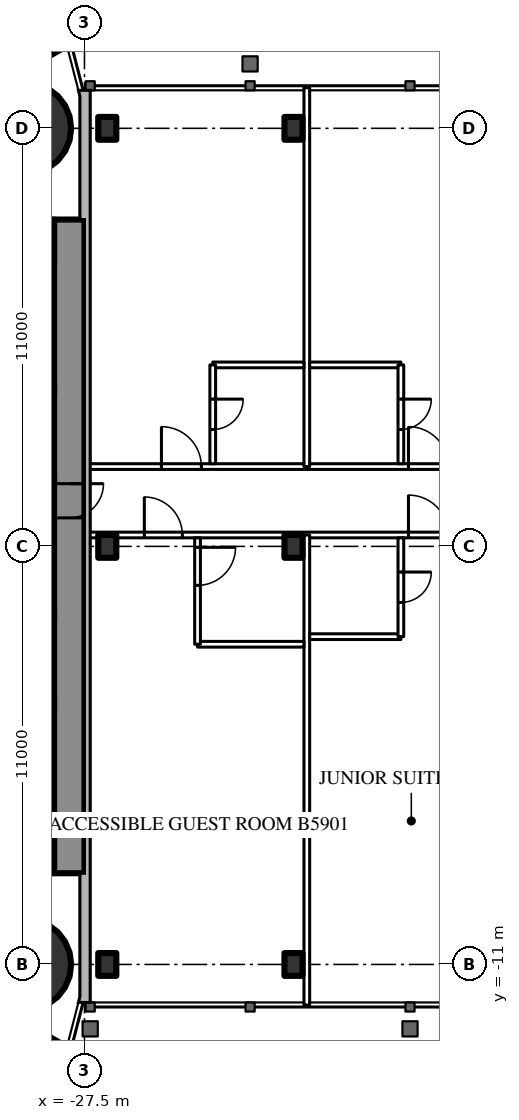
"""IFC4 building model, lengths in metres.
Left out: names, types, materials, properties, quantities, classifications, styles, units other than length and angle.
Written with IfcOpenShell. Run it as: python <this file> out.ifc"""

import sys

from ifc_helpers import new_model, si_unit, direction, frame, frame_2d, origin, origin_2d, place, context, subcontext, project, spatial, rectangle, circle, i_section, extrude, element, fill, save


model = new_model("IFC4")
c1 = context("Model", 3, precision=1e-05, world=origin(), true_north=direction((0.0, 1.0)))
c2 = subcontext(c1, "Body", "Model", "MODEL_VIEW")
j1 = project(units=[si_unit("LENGTHUNIT", "METRE"), si_unit("PLANEANGLEUNIT", "RADIAN")], contexts=[c1])
p1 = place(None, origin())
s1 = spatial("IfcSite", under=j1, at=p1, CompositionType="ELEMENT")
p2 = place(p1, origin())
s2 = spatial("IfcBuilding", under=s1, at=p2, CompositionType="ELEMENT")
p3 = place(p2, frame((0.0, 0.0, 222.5)))
s3 = spatial("IfcBuildingStorey", under=s2, at=p3, CompositionType="ELEMENT", Elevation=222.5)
for number, where, z_axis, x_axis in (
    (1, (-29.05, -11.0, 0.0), (0.0, 0.0, 1.0), (1.0, 0.0, 0.0)),
    (2, (-29.05, 11.0, 0.0), (0.0, 0.0, 1.0), (1.0, 0.0, 0.0)),
):
    element("IfcColumn", number, at=place(p3, frame(where, z_axis=z_axis, x_axis=x_axis)), inside=s3, PredefinedType="COLUMN", context=c2, shape_type="SweptSolid", body=[
        extrude(circle(Radius=1.2, at=origin_2d()), origin(), (0.0, 0.0, 1.0), 3.6),
    ])
p4 = place(p3, frame((-27.9, 8.6, 0.0), z_axis=(0.0, 0.0, 1.0), x_axis=(0.0, -1.0, 0.0)))
e3 = element("IfcWall", 3, at=p4, inside=s3, PredefinedType="SHEAR", context=c2, shape_type="SweptSolid", body=[
    extrude(rectangle(XDim=17.2, YDim=0.8, at=frame_2d((8.6, 0.0))), origin(), (0.0, 0.0, 1.0), 3.6),
])
p5 = place(p4, frame((6.95, 0.0, 0.0)))
e4 = element("IfcOpeningElement", 4, at=p5, cuts=e3, PredefinedType="OPENING", context=c2, shape_type="SweptSolid", body=[
    extrude(rectangle(XDim=0.9, YDim=2.2, at=frame_2d((0.45, 1.1))), frame((0.0, 0.41, 0.0), z_axis=(0.0, -1.0, 0.0), x_axis=(1.0, 0.0, 0.0)), (0.0, 0.0, 1.0), 0.82),
])
p6 = place(p3, frame((-28.3, 8.0, 0.0), z_axis=(0.0, 0.0, 1.0), x_axis=(-1.0, 0.0, 0.0)))
e5 = element("IfcWall", 5, at=p6, inside=s3, PredefinedType="SHEAR", context=c2, shape_type="SweptSolid", body=[
    extrude(rectangle(XDim=8.4, YDim=1.2, at=frame_2d((4.2, 0.0))), origin(), (0.0, 0.0, 1.0), 3.6),
])
p7 = place(p6, frame((0.25, 0.0, 0.0)))
e6 = element("IfcOpeningElement", 6, at=p7, cuts=e5, PredefinedType="OPENING", context=c2, shape_type="SweptSolid", body=[
    extrude(rectangle(XDim=1.0, YDim=2.2, at=frame_2d((0.5, 1.1))), frame((0.0, 0.61, 0.0), z_axis=(0.0, -1.0, 0.0), x_axis=(1.0, 0.0, 0.0)), (0.0, 0.0, 1.0), 1.22),
])
p8 = place(p3, frame((-28.3, -8.0, 0.0), z_axis=(0.0, 0.0, 1.0), x_axis=(-1.0, 0.0, 0.0)))
e7 = element("IfcWall", 7, at=p8, inside=s3, PredefinedType="SHEAR", context=c2, shape_type="SweptSolid", body=[
    extrude(rectangle(XDim=8.4, YDim=1.2, at=frame_2d((4.2, 0.0))), origin(), (0.0, 0.0, 1.0), 3.6),
])
p9 = place(p8, frame((0.25, 0.0, 0.0)))
e8 = element("IfcOpeningElement", 8, at=p9, cuts=e7, PredefinedType="OPENING", context=c2, shape_type="SweptSolid", body=[
    extrude(rectangle(XDim=1.0, YDim=2.2, at=frame_2d((0.5, 1.1))), frame((0.0, 0.61, 0.0), z_axis=(0.0, -1.0, 0.0), x_axis=(1.0, 0.0, 0.0)), (0.0, 0.0, 1.0), 1.22),
])
for number, where, z_axis, x_axis in (
    (9, (-28.3, 4.15, 0.0), (0.0, 0.0, 1.0), (-1.0, 0.0, 0.0)),
    (10, (-28.3, -4.15, 0.0), (0.0, 0.0, 1.0), (-1.0, 0.0, 0.0)),
):
    element("IfcWall", number, at=place(p3, frame(where, z_axis=z_axis, x_axis=x_axis)), inside=s3, PredefinedType="SHEAR", context=c2, shape_type="SweptSolid", body=[
        extrude(rectangle(XDim=8.4, YDim=0.3, at=frame_2d((4.2, 0.0))), origin(), (0.0, 0.0, 1.0), 3.6),
    ])
for number, where, z_axis, x_axis in (
    (11, (-28.3, 1.775, 0.0), (0.0, 0.0, 1.0), (-1.0, 0.0, 0.0)),
    (12, (-28.3, -1.775, 0.0), (0.0, 0.0, 1.0), (-1.0, 0.0, 0.0)),
):
    element("IfcWall", number, at=place(p3, frame(where, z_axis=z_axis, x_axis=x_axis)), inside=s3, PredefinedType="SHEAR", context=c2, shape_type="SweptSolid", body=[
        extrude(rectangle(XDim=2.9, YDim=0.25, at=frame_2d((1.45, 0.0))), origin(), (0.0, 0.0, 1.0), 3.6),
    ])
p10 = place(p3, frame((-27.2, 14.3, 0.0), z_axis=(0.0, 0.0, 1.0), x_axis=(-0.866026593062, -0.499997940104, 0.0)))
e13 = element("IfcWall", 13, at=p10, inside=s3, PredefinedType="SHEAR", context=c2, shape_type="SweptSolid", body=[
    extrude(rectangle(XDim=28.946, YDim=1.2, at=frame_2d((14.473, 0.0))), origin(), (0.0, 0.0, 1.0), 3.6),
])
p11 = place(p10, frame((4.6, 0.0, 0.0)))
e14 = element("IfcOpeningElement", 14, at=p11, cuts=e13, PredefinedType="OPENING", context=c2, shape_type="SweptSolid", body=[
    extrude(rectangle(XDim=1.0, YDim=2.2, at=frame_2d((0.5, 1.1))), frame((0.0, 0.61, 0.0), z_axis=(0.0, -1.0, 0.0), x_axis=(1.0, 0.0, 0.0)), (0.0, 0.0, 1.0), 1.22),
])
p12 = place(p10, frame((13.395, 0.0, 0.0)))
e15 = element("IfcOpeningElement", 15, at=p12, cuts=e13, PredefinedType="OPENING", context=c2, shape_type="SweptSolid", body=[
    extrude(rectangle(XDim=1.8, YDim=2.2, at=frame_2d((0.9, 1.1))), frame((0.0, 0.61, 0.0), z_axis=(0.0, -1.0, 0.0), x_axis=(1.0, 0.0, 0.0)), (0.0, 0.0, 1.0), 1.22),
])
p13 = place(p3, frame((-27.2, -14.3, 0.0), z_axis=(0.0, 0.0, 1.0), x_axis=(-0.866024021859, 0.500002393557, 0.0)))
e16 = element("IfcWall", 16, at=p13, inside=s3, PredefinedType="SHEAR", context=c2, shape_type="SweptSolid", body=[
    extrude(rectangle(XDim=27.907, YDim=1.2, at=frame_2d((13.954, 0.0))), origin(), (0.0, 0.0, 1.0), 3.6),
])
p14 = place(p13, frame((4.6, 0.0, 0.0)))
e17 = element("IfcOpeningElement", 17, at=p14, cuts=e16, PredefinedType="OPENING", context=c2, shape_type="SweptSolid", body=[
    extrude(rectangle(XDim=1.0, YDim=2.2, at=frame_2d((0.5, 1.1))), frame((0.0, 0.61, 0.0), z_axis=(0.0, -1.0, 0.0), x_axis=(1.0, 0.0, 0.0)), (0.0, 0.0, 1.0), 1.22),
])
p15 = place(p13, frame((13.395, 0.0, 0.0)))
e18 = element("IfcOpeningElement", 18, at=p15, cuts=e16, PredefinedType="OPENING", context=c2, shape_type="SweptSolid", body=[
    extrude(rectangle(XDim=1.8, YDim=2.2, at=frame_2d((0.9, 1.1))), frame((0.0, 0.61, 0.0), z_axis=(0.0, -1.0, 0.0), x_axis=(1.0, 0.0, 0.0)), (0.0, 0.0, 1.0), 1.22),
])
for number, where, z_axis, x_axis in (
    (19, (-26.9, -11.0, 0.0), (0.0, 0.0, 1.0), (1.0, 0.0, 0.0)),
    (20, (-22.0, -11.0, 0.0), (0.0, 0.0, 1.0), (1.0, 0.0, 0.0)),
    (21, (-26.9, 0.0, 0.0), (0.0, 0.0, 1.0), (1.0, 0.0, 0.0)),
    (22, (-22.0, 0.0, 0.0), (0.0, 0.0, 1.0), (1.0, 0.0, 0.0)),
    (23, (-26.9, 11.0, 0.0), (0.0, 0.0, 1.0), (1.0, 0.0, 0.0)),
    (24, (-22.0, 11.0, 0.0), (0.0, 0.0, 1.0), (1.0, 0.0, 0.0)),
):
    element("IfcColumn", number, at=place(p3, frame(where, z_axis=z_axis, x_axis=x_axis)), inside=s3, PredefinedType="COLUMN", context=c2, shape_type="SweptSolid", body=[
        extrude(i_section(OverallWidth=0.476, OverallDepth=0.6, WebThickness=0.1, FlangeThickness=0.14, FilletRadius=0.02, at=origin_2d()), origin(), (0.0, 0.0, 1.0), 3.6),
    ])
p16 = place(p3, frame((-27.5, 0.3, 0.0), z_axis=(0.0, 0.0, 1.0), x_axis=(1.0, 0.0, 0.0)))
e25 = element("IfcWall", 25, at=p16, inside=s3, PredefinedType="PARTITIONING", context=c2, shape_type="SweptSolid", body=[
    extrude(rectangle(XDim=55.0, YDim=0.15, at=frame_2d((27.5, 0.0))), origin(), (0.0, 0.0, 1.0), 2.4),
])
p17 = place(p16, frame((1.575, 0.0, 0.0)))
e26 = element("IfcOpeningElement", 26, at=p17, cuts=e25, PredefinedType="OPENING", context=c2, shape_type="SweptSolid", body=[
    extrude(rectangle(XDim=1.0, YDim=2.2, at=frame_2d((0.5, 1.1))), frame((0.0, 0.085, 0.0), z_axis=(0.0, -1.0, 0.0), x_axis=(1.0, 0.0, 0.0)), (0.0, 0.0, 1.0), 0.17),
])
p18 = place(p16, frame((8.525, 0.0, 0.0)))
e27 = element("IfcOpeningElement", 27, at=p18, cuts=e25, PredefinedType="OPENING", context=c2, shape_type="SweptSolid", body=[
    extrude(rectangle(XDim=1.05, YDim=2.4, at=frame_2d((0.525, 1.2))), frame((0.0, 0.085, 0.0), z_axis=(0.0, -1.0, 0.0), x_axis=(1.0, 0.0, 0.0)), (0.0, 0.0, 1.0), 0.17),
])
p19 = place(p16, frame((14.025, 0.0, 0.0)))
e28 = element("IfcOpeningElement", 28, at=p19, cuts=e25, PredefinedType="OPENING", context=c2, shape_type="SweptSolid", body=[
    extrude(rectangle(XDim=1.05, YDim=2.4, at=frame_2d((0.525, 1.2))), frame((0.0, 0.085, 0.0), z_axis=(0.0, -1.0, 0.0), x_axis=(1.0, 0.0, 0.0)), (0.0, 0.0, 1.0), 0.17),
])
p20 = place(p16, frame((19.525, 0.0, 0.0)))
e29 = element("IfcOpeningElement", 29, at=p20, cuts=e25, PredefinedType="OPENING", context=c2, shape_type="SweptSolid", body=[
    extrude(rectangle(XDim=1.05, YDim=2.4, at=frame_2d((0.525, 1.2))), frame((0.0, 0.085, 0.0), z_axis=(0.0, -1.0, 0.0), x_axis=(1.0, 0.0, 0.0)), (0.0, 0.0, 1.0), 0.17),
])
p21 = place(p16, frame((25.025, 0.0, 0.0)))
e30 = element("IfcOpeningElement", 30, at=p21, cuts=e25, PredefinedType="OPENING", context=c2, shape_type="SweptSolid", body=[
    extrude(rectangle(XDim=1.05, YDim=2.4, at=frame_2d((0.525, 1.2))), frame((0.0, 0.085, 0.0), z_axis=(0.0, -1.0, 0.0), x_axis=(1.0, 0.0, 0.0)), (0.0, 0.0, 1.0), 0.17),
])
p22 = place(p16, frame((30.525, 0.0, 0.0)))
e31 = element("IfcOpeningElement", 31, at=p22, cuts=e25, PredefinedType="OPENING", context=c2, shape_type="SweptSolid", body=[
    extrude(rectangle(XDim=1.05, YDim=2.4, at=frame_2d((0.525, 1.2))), frame((0.0, 0.085, 0.0), z_axis=(0.0, -1.0, 0.0), x_axis=(1.0, 0.0, 0.0)), (0.0, 0.0, 1.0), 0.17),
])
p23 = place(p16, frame((36.025, 0.0, 0.0)))
e32 = element("IfcOpeningElement", 32, at=p23, cuts=e25, PredefinedType="OPENING", context=c2, shape_type="SweptSolid", body=[
    extrude(rectangle(XDim=1.05, YDim=2.4, at=frame_2d((0.525, 1.2))), frame((0.0, 0.085, 0.0), z_axis=(0.0, -1.0, 0.0), x_axis=(1.0, 0.0, 0.0)), (0.0, 0.0, 1.0), 0.17),
])
p24 = place(p16, frame((41.525, 0.0, 0.0)))
e33 = element("IfcOpeningElement", 33, at=p24, cuts=e25, PredefinedType="OPENING", context=c2, shape_type="SweptSolid", body=[
    extrude(rectangle(XDim=1.05, YDim=2.4, at=frame_2d((0.525, 1.2))), frame((0.0, 0.085, 0.0), z_axis=(0.0, -1.0, 0.0), x_axis=(1.0, 0.0, 0.0)), (0.0, 0.0, 1.0), 0.17),
])
p25 = place(p16, frame((47.025, 0.0, 0.0)))
e34 = element("IfcOpeningElement", 34, at=p25, cuts=e25, PredefinedType="OPENING", context=c2, shape_type="SweptSolid", body=[
    extrude(rectangle(XDim=1.05, YDim=2.4, at=frame_2d((0.525, 1.2))), frame((0.0, 0.085, 0.0), z_axis=(0.0, -1.0, 0.0), x_axis=(1.0, 0.0, 0.0)), (0.0, 0.0, 1.0), 0.17),
])
p26 = place(p16, frame((52.525, 0.0, 0.0)))
e35 = element("IfcOpeningElement", 35, at=p26, cuts=e25, PredefinedType="OPENING", context=c2, shape_type="SweptSolid", body=[
    extrude(rectangle(XDim=1.05, YDim=2.4, at=frame_2d((0.525, 1.2))), frame((0.0, 0.085, 0.0), z_axis=(0.0, -1.0, 0.0), x_axis=(1.0, 0.0, 0.0)), (0.0, 0.0, 1.0), 0.17),
])
p27 = place(p3, frame((-27.5, 2.1, 0.0), z_axis=(0.0, 0.0, 1.0), x_axis=(1.0, 0.0, 0.0)))
e36 = element("IfcWall", 36, at=p27, inside=s3, PredefinedType="PARTITIONING", context=c2, shape_type="SweptSolid", body=[
    extrude(rectangle(XDim=55.0, YDim=0.15, at=frame_2d((27.5, 0.0))), origin(), (0.0, 0.0, 1.0), 3.4),
])
p28 = place(p27, frame((2.025, 0.0, 0.0)))
e37 = element("IfcOpeningElement", 37, at=p28, cuts=e36, PredefinedType="OPENING", context=c2, shape_type="SweptSolid", body=[
    extrude(rectangle(XDim=1.05, YDim=2.4, at=frame_2d((0.525, 1.2))), frame((0.0, 0.085, 0.0), z_axis=(0.0, -1.0, 0.0), x_axis=(1.0, 0.0, 0.0)), (0.0, 0.0, 1.0), 0.17),
])
p29 = place(p27, frame((8.525, 0.0, 0.0)))
e38 = element("IfcOpeningElement", 38, at=p29, cuts=e36, PredefinedType="OPENING", context=c2, shape_type="SweptSolid", body=[
    extrude(rectangle(XDim=1.05, YDim=2.4, at=frame_2d((0.525, 1.2))), frame((0.0, 0.085, 0.0), z_axis=(0.0, -1.0, 0.0), x_axis=(1.0, 0.0, 0.0)), (0.0, 0.0, 1.0), 0.17),
])
p30 = place(p27, frame((14.025, 0.0, 0.0)))
e39 = element("IfcOpeningElement", 39, at=p30, cuts=e36, PredefinedType="OPENING", context=c2, shape_type="SweptSolid", body=[
    extrude(rectangle(XDim=1.05, YDim=2.4, at=frame_2d((0.525, 1.2))), frame((0.0, 0.085, 0.0), z_axis=(0.0, -1.0, 0.0), x_axis=(1.0, 0.0, 0.0)), (0.0, 0.0, 1.0), 0.17),
])
p31 = place(p27, frame((19.525, 0.0, 0.0)))
e40 = element("IfcOpeningElement", 40, at=p31, cuts=e36, PredefinedType="OPENING", context=c2, shape_type="SweptSolid", body=[
    extrude(rectangle(XDim=1.05, YDim=2.4, at=frame_2d((0.525, 1.2))), frame((0.0, 0.085, 0.0), z_axis=(0.0, -1.0, 0.0), x_axis=(1.0, 0.0, 0.0)), (0.0, 0.0, 1.0), 0.17),
])
p32 = place(p27, frame((25.025, 0.0, 0.0)))
e41 = element("IfcOpeningElement", 41, at=p32, cuts=e36, PredefinedType="OPENING", context=c2, shape_type="SweptSolid", body=[
    extrude(rectangle(XDim=1.05, YDim=2.4, at=frame_2d((0.525, 1.2))), frame((0.0, 0.085, 0.0), z_axis=(0.0, -1.0, 0.0), x_axis=(1.0, 0.0, 0.0)), (0.0, 0.0, 1.0), 0.17),
])
p33 = place(p27, frame((30.525, 0.0, 0.0)))
e42 = element("IfcOpeningElement", 42, at=p33, cuts=e36, PredefinedType="OPENING", context=c2, shape_type="SweptSolid", body=[
    extrude(rectangle(XDim=1.05, YDim=2.4, at=frame_2d((0.525, 1.2))), frame((0.0, 0.085, 0.0), z_axis=(0.0, -1.0, 0.0), x_axis=(1.0, 0.0, 0.0)), (0.0, 0.0, 1.0), 0.17),
])
p34 = place(p27, frame((36.025, 0.0, 0.0)))
e43 = element("IfcOpeningElement", 43, at=p34, cuts=e36, PredefinedType="OPENING", context=c2, shape_type="SweptSolid", body=[
    extrude(rectangle(XDim=1.05, YDim=2.4, at=frame_2d((0.525, 1.2))), frame((0.0, 0.085, 0.0), z_axis=(0.0, -1.0, 0.0), x_axis=(1.0, 0.0, 0.0)), (0.0, 0.0, 1.0), 0.17),
])
p35 = place(p27, frame((41.525, 0.0, 0.0)))
e44 = element("IfcOpeningElement", 44, at=p35, cuts=e36, PredefinedType="OPENING", context=c2, shape_type="SweptSolid", body=[
    extrude(rectangle(XDim=1.05, YDim=2.4, at=frame_2d((0.525, 1.2))), frame((0.0, 0.085, 0.0), z_axis=(0.0, -1.0, 0.0), x_axis=(1.0, 0.0, 0.0)), (0.0, 0.0, 1.0), 0.17),
])
p36 = place(p27, frame((47.025, 0.0, 0.0)))
e45 = element("IfcOpeningElement", 45, at=p36, cuts=e36, PredefinedType="OPENING", context=c2, shape_type="SweptSolid", body=[
    extrude(rectangle(XDim=1.05, YDim=2.4, at=frame_2d((0.525, 1.2))), frame((0.0, 0.085, 0.0), z_axis=(0.0, -1.0, 0.0), x_axis=(1.0, 0.0, 0.0)), (0.0, 0.0, 1.0), 0.17),
])
p37 = place(p27, frame((52.525, 0.0, 0.0)))
e46 = element("IfcOpeningElement", 46, at=p37, cuts=e36, PredefinedType="OPENING", context=c2, shape_type="SweptSolid", body=[
    extrude(rectangle(XDim=1.05, YDim=2.4, at=frame_2d((0.525, 1.2))), frame((0.0, 0.085, 0.0), z_axis=(0.0, -1.0, 0.0), x_axis=(1.0, 0.0, 0.0)), (0.0, 0.0, 1.0), 0.17),
])
p38 = place(p3, frame((-21.65, -12.07, 0.0), z_axis=(0.0, 0.0, 1.0), x_axis=(0.0, 1.0, 0.0)))
e47 = element("IfcWall", 47, at=p38, inside=s3, PredefinedType="PARTITIONING", context=c2, shape_type="SweptSolid", body=[
    extrude(rectangle(XDim=12.37, YDim=0.15, at=frame_2d((6.185, 0.0))), origin(), (0.0, 0.0, 1.0), 3.4),
])
p39 = place(p3, frame((-24.525, -2.575, 0.0), z_axis=(0.0, 0.0, 1.0), x_axis=(1.0, 0.0, 0.0)))
e48 = element("IfcWall", 48, at=p39, inside=s3, PredefinedType="PARTITIONING", context=c2, shape_type="SweptSolid", body=[
    extrude(rectangle(XDim=2.8, YDim=0.15, at=frame_2d((1.4, 0.0))), origin(), (0.0, 0.0, 1.0), 3.4),
])
p40 = place(p3, frame((-24.525, -2.575, 0.0), z_axis=(0.0, 0.0, 1.0), x_axis=(0.0, 1.0, 0.0)))
e49 = element("IfcWall", 49, at=p40, inside=s3, PredefinedType="PARTITIONING", context=c2, shape_type="SweptSolid", body=[
    extrude(rectangle(XDim=2.8, YDim=0.15, at=frame_2d((1.4, 0.0))), origin(), (0.0, 0.0, 1.0), 3.4),
])
p41 = place(p40, frame((1.55, 0.0, 0.0)))
e50 = element("IfcOpeningElement", 50, at=p41, cuts=e49, PredefinedType="OPENING", context=c2, shape_type="SweptSolid", body=[
    extrude(rectangle(XDim=1.0, YDim=2.2, at=frame_2d((0.5, 1.1))), frame((0.0, 0.085, 0.0), z_axis=(0.0, -1.0, 0.0), x_axis=(1.0, 0.0, 0.0)), (0.0, 0.0, 1.0), 0.17),
])
p42 = place(p3, frame((-21.575, -2.375, 0.0), z_axis=(0.0, 0.0, 1.0), x_axis=(1.0, 0.0, 0.0)))
e51 = element("IfcWall", 51, at=p42, inside=s3, PredefinedType="PARTITIONING", context=c2, shape_type="SweptSolid", body=[
    extrude(rectangle(XDim=2.4, YDim=0.15, at=frame_2d((1.2, 0.0))), origin(), (0.0, 0.0, 1.0), 3.4),
])
p43 = place(p3, frame((-19.175, -2.375, 0.0), z_axis=(0.0, 0.0, 1.0), x_axis=(0.0, 1.0, 0.0)))
e52 = element("IfcWall", 52, at=p43, inside=s3, PredefinedType="PARTITIONING", context=c2, shape_type="SweptSolid", body=[
    extrude(rectangle(XDim=2.6, YDim=0.15, at=frame_2d((1.3, 0.0))), origin(), (0.0, 0.0, 1.0), 3.4),
])
p44 = place(p43, frame((0.9, 0.0, 0.0)))
e53 = element("IfcOpeningElement", 53, at=p44, cuts=e52, PredefinedType="OPENING", context=c2, shape_type="SweptSolid", body=[
    extrude(rectangle(XDim=0.8, YDim=2.2, at=frame_2d((0.4, 1.1))), frame((0.0, 0.085, 0.0), z_axis=(0.0, -1.0, 0.0), x_axis=(1.0, 0.0, 0.0)), (0.0, 0.0, 1.0), 0.17),
])
p45 = place(p3, frame((-21.65, 2.1, 0.0), z_axis=(0.0, 0.0, 1.0), x_axis=(0.0, 1.0, 0.0)))
e54 = element("IfcWall", 54, at=p45, inside=s3, PredefinedType="PARTITIONING", context=c2, shape_type="SweptSolid", body=[
    extrude(rectangle(XDim=9.97, YDim=0.15, at=frame_2d((4.985, 0.0))), origin(), (0.0, 0.0, 1.0), 3.4),
])
p46 = place(p3, frame((-24.125, 4.775, 0.0), z_axis=(0.0, 0.0, 1.0), x_axis=(1.0, 0.0, 0.0)))
e55 = element("IfcWall", 55, at=p46, inside=s3, PredefinedType="PARTITIONING", context=c2, shape_type="SweptSolid", body=[
    extrude(rectangle(XDim=2.4, YDim=0.15, at=frame_2d((1.2, 0.0))), origin(), (0.0, 0.0, 1.0), 3.4),
])
p47 = place(p3, frame((-24.125, 2.175, 0.0), z_axis=(0.0, 0.0, 1.0), x_axis=(0.0, 1.0, 0.0)))
e56 = element("IfcWall", 56, at=p47, inside=s3, PredefinedType="PARTITIONING", context=c2, shape_type="SweptSolid", body=[
    extrude(rectangle(XDim=2.6, YDim=0.15, at=frame_2d((1.3, 0.0))), origin(), (0.0, 0.0, 1.0), 3.4),
])
p48 = place(p47, frame((0.9, 0.0, 0.0)))
e57 = element("IfcOpeningElement", 57, at=p48, cuts=e56, PredefinedType="OPENING", context=c2, shape_type="SweptSolid", body=[
    extrude(rectangle(XDim=0.8, YDim=2.2, at=frame_2d((0.4, 1.1))), frame((0.0, 0.085, 0.0), z_axis=(0.0, -1.0, 0.0), x_axis=(1.0, 0.0, 0.0)), (0.0, 0.0, 1.0), 0.17),
])
p49 = place(p3, frame((-21.575, 4.775, 0.0), z_axis=(0.0, 0.0, 1.0), x_axis=(1.0, 0.0, 0.0)))
e58 = element("IfcWall", 58, at=p49, inside=s3, PredefinedType="PARTITIONING", context=c2, shape_type="SweptSolid", body=[
    extrude(rectangle(XDim=2.4, YDim=0.15, at=frame_2d((1.2, 0.0))), origin(), (0.0, 0.0, 1.0), 3.4),
])
p50 = place(p3, frame((-19.175, 2.175, 0.0), z_axis=(0.0, 0.0, 1.0), x_axis=(0.0, 1.0, 0.0)))
e59 = element("IfcWall", 59, at=p50, inside=s3, PredefinedType="PARTITIONING", context=c2, shape_type="SweptSolid", body=[
    extrude(rectangle(XDim=2.6, YDim=0.15, at=frame_2d((1.3, 0.0))), origin(), (0.0, 0.0, 1.0), 3.4),
])
p51 = place(p50, frame((0.9, 0.0, 0.0)))
e60 = element("IfcOpeningElement", 60, at=p51, cuts=e59, PredefinedType="OPENING", context=c2, shape_type="SweptSolid", body=[
    extrude(rectangle(XDim=0.8, YDim=2.2, at=frame_2d((0.4, 1.1))), frame((0.0, 0.085, 0.0), z_axis=(0.0, -1.0, 0.0), x_axis=(1.0, 0.0, 0.0)), (0.0, 0.0, 1.0), 0.17),
])
p52 = place(p5, origin())
e61 = element("IfcDoor", 61, at=p52, inside=s3, OperationType="SINGLE_SWING_LEFT", PredefinedType="DOOR", context=c2, shape_type="SweptSolid", body=[
    extrude(rectangle(XDim=0.9, YDim=2.2, at=frame_2d((0.45, 1.1))), frame((0.0, 0.025, 0.0), z_axis=(0.0, -1.0, 0.0), x_axis=(1.0, 0.0, 0.0)), (0.0, 0.0, 1.0), 0.05),
])
fill(e4, e61)
p53 = place(p41, origin())
e62 = element("IfcDoor", 62, at=p53, inside=s3, OperationType="SINGLE_SWING_RIGHT", PredefinedType="DOOR", context=c2, shape_type="SweptSolid", body=[
    extrude(rectangle(XDim=1.0, YDim=2.2, at=frame_2d((0.5, 1.1))), frame((0.0, 0.025, 0.0), z_axis=(0.0, -1.0, 0.0), x_axis=(1.0, 0.0, 0.0)), (0.0, 0.0, 1.0), 0.05),
])
fill(e50, e62)
p54 = place(p17, origin())
e63 = element("IfcDoor", 63, at=p54, inside=s3, OperationType="SINGLE_SWING_LEFT", PredefinedType="DOOR", context=c2, shape_type="SweptSolid", body=[
    extrude(rectangle(XDim=1.0, YDim=2.2, at=frame_2d((0.5, 1.1))), frame((0.0, 0.025, 0.0), z_axis=(0.0, -1.0, 0.0), x_axis=(1.0, 0.0, 0.0)), (0.0, 0.0, 1.0), 0.05),
])
fill(e26, e63)
p55 = place(p44, origin())
e64 = element("IfcDoor", 64, at=p55, inside=s3, OperationType="SINGLE_SWING_RIGHT", PredefinedType="DOOR", context=c2, shape_type="SweptSolid", body=[
    extrude(rectangle(XDim=0.8, YDim=2.2, at=frame_2d((0.4, 1.1))), frame((0.0, 0.025, 0.0), z_axis=(0.0, -1.0, 0.0), x_axis=(1.0, 0.0, 0.0)), (0.0, 0.0, 1.0), 0.05),
])
fill(e53, e64)
p56 = place(p18, origin())
e65 = element("IfcDoor", 65, at=p56, inside=s3, OperationType="SINGLE_SWING_LEFT", PredefinedType="DOOR", context=c2, shape_type="SweptSolid", body=[
    extrude(rectangle(XDim=1.05, YDim=2.4, at=frame_2d((0.525, 1.2))), frame((0.0, 0.025, 0.0), z_axis=(0.0, -1.0, 0.0), x_axis=(1.0, 0.0, 0.0)), (0.0, 0.0, 1.0), 0.05),
])
fill(e27, e65)
p57 = place(p48, origin())
e66 = element("IfcDoor", 66, at=p57, inside=s3, OperationType="SINGLE_SWING_RIGHT", PredefinedType="DOOR", context=c2, shape_type="SweptSolid", body=[
    extrude(rectangle(XDim=0.8, YDim=2.2, at=frame_2d((0.4, 1.1))), frame((0.0, 0.025, 0.0), z_axis=(0.0, -1.0, 0.0), x_axis=(1.0, 0.0, 0.0)), (0.0, 0.0, 1.0), 0.05),
])
fill(e57, e66)
p58 = place(p28, origin())
e67 = element("IfcDoor", 67, at=p58, inside=s3, OperationType="SINGLE_SWING_LEFT", PredefinedType="DOOR", context=c2, shape_type="SweptSolid", body=[
    extrude(rectangle(XDim=1.05, YDim=2.4, at=frame_2d((0.525, 1.2))), frame((0.0, 0.025, 0.0), z_axis=(0.0, -1.0, 0.0), x_axis=(1.0, 0.0, 0.0)), (0.0, 0.0, 1.0), 0.05),
])
fill(e37, e67)
p59 = place(p51, origin())
e68 = element("IfcDoor", 68, at=p59, inside=s3, OperationType="SINGLE_SWING_RIGHT", PredefinedType="DOOR", context=c2, shape_type="SweptSolid", body=[
    extrude(rectangle(XDim=0.8, YDim=2.2, at=frame_2d((0.4, 1.1))), frame((0.0, 0.025, 0.0), z_axis=(0.0, -1.0, 0.0), x_axis=(1.0, 0.0, 0.0)), (0.0, 0.0, 1.0), 0.05),
])
fill(e60, e68)
p60 = place(p29, origin())
e69 = element("IfcDoor", 69, at=p60, inside=s3, OperationType="SINGLE_SWING_LEFT", PredefinedType="DOOR", context=c2, shape_type="SweptSolid", body=[
    extrude(rectangle(XDim=1.05, YDim=2.4, at=frame_2d((0.525, 1.2))), frame((0.0, 0.025, 0.0), z_axis=(0.0, -1.0, 0.0), x_axis=(1.0, 0.0, 0.0)), (0.0, 0.0, 1.0), 0.05),
])
fill(e38, e69)
save(model, sys.argv[1])
